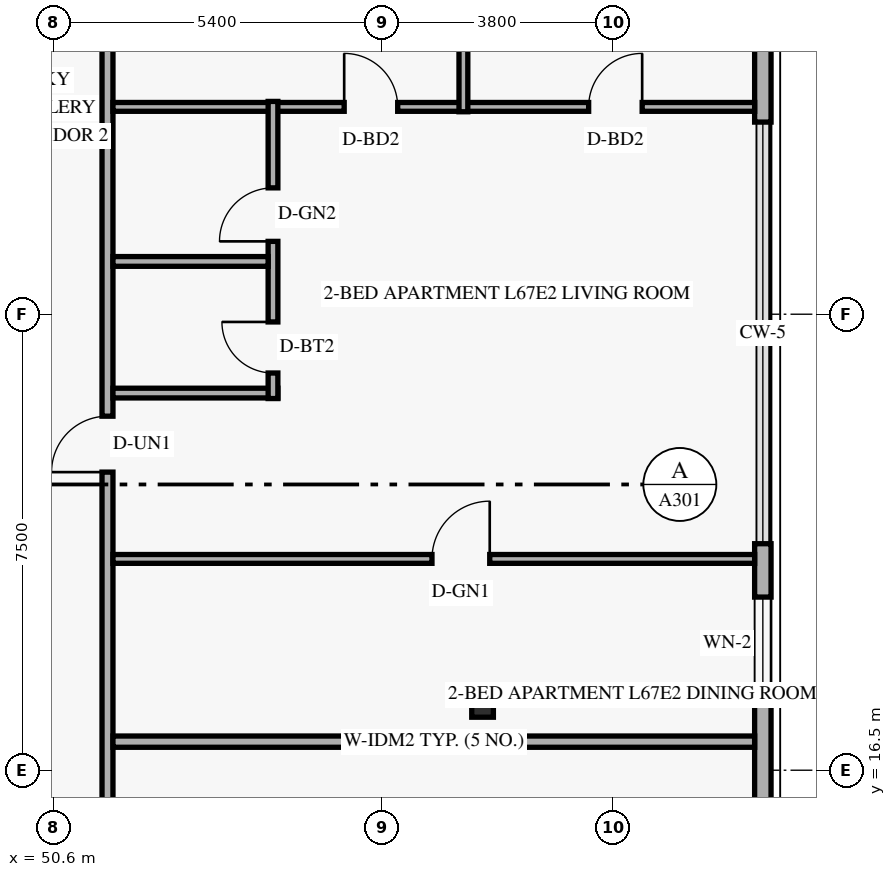
"""IFC4 building model, lengths in metres.
Left out: names, types, materials, properties, quantities, classifications, styles, units other than length and angle.
Written with IfcOpenShell. Run it as: python <this file> out.ifc"""

import sys

from ifc_helpers import new_model, si_unit, direction, frame, frame_2d, origin, origin_2d, place, context, subcontext, project, spatial, rectangle, hollow_rectangle, extrude, element, fill, save


model = new_model("IFC4")
c1 = context("Model", 3, precision=1e-05, world=origin(), true_north=direction((0.0, 1.0)))
c2 = subcontext(c1, "Body", "Model", "MODEL_VIEW")
j1 = project(units=[si_unit("LENGTHUNIT", "METRE"), si_unit("PLANEANGLEUNIT", "RADIAN")], contexts=[c1])
p1 = place(None, origin())
s1 = spatial("IfcSite", under=j1, at=p1, CompositionType="ELEMENT")
p2 = place(p1, origin())
s2 = spatial("IfcBuilding", under=s1, at=p2, CompositionType="ELEMENT")
p3 = place(p2, frame((0.0, 0.0, 256.8)))
s3 = spatial("IfcBuildingStorey", under=s2, at=p3, CompositionType="ELEMENT", Elevation=256.8)
p4 = place(p3, frame((57.551, 17.55, 0.0), z_axis=(0.057888518877, 0.0, 0.998323053617), x_axis=(0.0, 1.0, 0.0)))
e1 = element("IfcColumn", 1, at=p4, inside=s3, PredefinedType="COLUMN", context=c2, shape_type="SweptSolid", body=[
    extrude(hollow_rectangle(XDim=0.356, YDim=0.356, WallThickness=0.016, at=origin_2d()), origin(), (0.0, 0.0, 1.0), 3.606),
])
p5 = place(p3, frame((62.265, 9.12, 0.0), z_axis=(0.0, 0.0, 1.0), x_axis=(0.0, 1.0, 0.0)))
e2 = element("IfcWall", 2, at=p5, inside=s3, PredefinedType="SOLIDWALL", context=c2, shape_type="SweptSolid", body=[
    extrude(rectangle(XDim=11.105, YDim=0.27, at=frame_2d((5.553, 0.0))), origin(), (0.0, 0.0, 1.0), 3.36),
])
p6 = place(p5, frame((3.435, 0.0, 0.85)))
e3 = element("IfcOpeningElement", 3, at=p6, cuts=e2, PredefinedType="OPENING", context=c2, shape_type="SweptSolid", body=[
    extrude(rectangle(XDim=1.5, YDim=1.55, at=frame_2d((0.75, 0.775))), frame((0.0, 0.145, 0.0), z_axis=(0.0, -1.0, 0.0), x_axis=(1.0, 0.0, 0.0)), (0.0, 0.0, 1.0), 0.29),
])
p7 = place(p5, frame((8.728, 0.0, 0.85)))
e4 = element("IfcOpeningElement", 4, at=p7, cuts=e2, PredefinedType="OPENING", context=c2, shape_type="SweptSolid", body=[
    extrude(rectangle(XDim=1.5, YDim=1.55, at=frame_2d((0.75, 0.775))), frame((0.0, 0.145, 0.0), z_axis=(0.0, -1.0, 0.0), x_axis=(1.0, 0.0, 0.0)), (0.0, 0.0, 1.0), 0.29),
])
p8 = place(p3, frame((62.265, 27.16, 0.0), z_axis=(0.0, 0.0, 1.0), x_axis=(0.0, 1.0, 0.0)))
e5 = element("IfcWall", 5, at=p8, inside=s3, PredefinedType="SOLIDWALL", context=c2, shape_type="SweptSolid", body=[
    extrude(rectangle(XDim=11.72, YDim=0.27, at=frame_2d((5.86, 0.0))), origin(), (0.0, 0.0, 1.0), 3.36),
])
p9 = place(p8, frame((1.37, 0.0, 0.85)))
e6 = element("IfcOpeningElement", 6, at=p9, cuts=e5, PredefinedType="OPENING", context=c2, shape_type="SweptSolid", body=[
    extrude(rectangle(XDim=1.5, YDim=1.55, at=frame_2d((0.75, 0.775))), frame((0.0, 0.145, 0.0), z_axis=(0.0, -1.0, 0.0), x_axis=(1.0, 0.0, 0.0)), (0.0, 0.0, 1.0), 0.29),
])
p10 = place(p8, frame((7.035, 0.0, 0.85)))
e7 = element("IfcOpeningElement", 7, at=p10, cuts=e5, PredefinedType="OPENING", context=c2, shape_type="SweptSolid", body=[
    extrude(rectangle(XDim=1.5, YDim=1.55, at=frame_2d((0.75, 0.775))), frame((0.0, 0.145, 0.0), z_axis=(0.0, -1.0, 0.0), x_axis=(1.0, 0.0, 0.0)), (0.0, 0.0, 1.0), 0.29),
])
p11 = place(p3, frame((51.487, 5.77, 0.0), z_axis=(0.0, 0.0, 1.0), x_axis=(0.0, 1.0, 0.0)))
e8 = element("IfcWall", 8, at=p11, inside=s3, PredefinedType="STANDARD", context=c2, shape_type="SweptSolid", body=[
    extrude(rectangle(XDim=36.46, YDim=0.18, at=frame_2d((18.23, 0.0))), origin(), (0.0, 0.0, 1.0), 2.803),
])
p12 = place(p11, frame((8.907, 0.0, 0.0)))
e9 = element("IfcOpeningElement", 9, at=p12, cuts=e8, PredefinedType="OPENING", context=c2, shape_type="SweptSolid", body=[
    extrude(rectangle(XDim=0.92, YDim=2.15, at=frame_2d((0.46, 1.075))), frame((0.0, 0.1, 0.0), z_axis=(0.0, -1.0, 0.0), x_axis=(1.0, 0.0, 0.0)), (0.0, 0.0, 1.0), 0.2),
])
p13 = place(p11, frame((15.633, 0.0, 0.0)))
e10 = element("IfcOpeningElement", 10, at=p13, cuts=e8, PredefinedType="OPENING", context=c2, shape_type="SweptSolid", body=[
    extrude(rectangle(XDim=0.92, YDim=2.15, at=frame_2d((0.46, 1.075))), frame((0.0, 0.1, 0.0), z_axis=(0.0, -1.0, 0.0), x_axis=(1.0, 0.0, 0.0)), (0.0, 0.0, 1.0), 0.2),
])
p14 = place(p11, frame((26.685, 0.0, 0.0)))
e11 = element("IfcOpeningElement", 11, at=p14, cuts=e8, PredefinedType="OPENING", context=c2, shape_type="SweptSolid", body=[
    extrude(rectangle(XDim=0.92, YDim=2.15, at=frame_2d((0.46, 1.075))), frame((0.0, 0.1, 0.0), z_axis=(0.0, -1.0, 0.0), x_axis=(1.0, 0.0, 0.0)), (0.0, 0.0, 1.0), 0.2),
])
p15 = place(p3, frame((51.577, 16.97, 0.0), z_axis=(0.0, 0.0, 1.0), x_axis=(1.0, 0.0, 0.0)))
e12 = element("IfcWall", 12, at=p15, inside=s3, PredefinedType="PARTITIONING", context=c2, shape_type="SweptSolid", body=[
    extrude(rectangle(XDim=10.553, YDim=0.185, at=frame_2d((5.276, 0.0))), origin(), (0.0, 0.0, 1.0), 2.879),
])
p16 = place(p3, frame((51.577, 27.41, 0.0), z_axis=(0.0, 0.0, 1.0), x_axis=(1.0, 0.0, 0.0)))
e13 = element("IfcWall", 13, at=p16, inside=s3, PredefinedType="PARTITIONING", context=c2, shape_type="SweptSolid", body=[
    extrude(rectangle(XDim=10.553, YDim=0.145, at=frame_2d((5.276, 0.0))), origin(), (0.0, 0.0, 1.0), 2.879),
])
p17 = place(p16, frame((3.803, 0.0, 0.0)))
e14 = element("IfcOpeningElement", 14, at=p17, cuts=e13, PredefinedType="OPENING", context=c2, shape_type="SweptSolid", body=[
    extrude(rectangle(XDim=0.88, YDim=2.14, at=frame_2d((0.44, 1.07))), frame((0.0, 0.083, 0.0), z_axis=(0.0, -1.0, 0.0), x_axis=(1.0, 0.0, 0.0)), (0.0, 0.0, 1.0), 0.165),
])
p18 = place(p16, frame((7.823, 0.0, 0.0)))
e15 = element("IfcOpeningElement", 15, at=p18, cuts=e13, PredefinedType="OPENING", context=c2, shape_type="SweptSolid", body=[
    extrude(rectangle(XDim=0.88, YDim=2.14, at=frame_2d((0.44, 1.07))), frame((0.0, 0.083, 0.0), z_axis=(0.0, -1.0, 0.0), x_axis=(1.0, 0.0, 0.0)), (0.0, 0.0, 1.0), 0.165),
])
p19 = place(p3, frame((51.577, 22.703, 0.0), z_axis=(0.0, 0.0, 1.0), x_axis=(1.0, 0.0, 0.0)))
e16 = element("IfcWall", 16, at=p19, inside=s3, PredefinedType="PLUMBINGWALL", context=c2, shape_type="SweptSolid", body=[
    extrude(rectangle(XDim=2.712, YDim=0.16, at=frame_2d((1.356, 0.0))), origin(), (0.0, 0.0, 1.0), 3.36),
])
p20 = place(p3, frame((54.209, 22.613, 0.0), z_axis=(0.0, 0.0, 1.0), x_axis=(0.0, 1.0, 0.0)))
e17 = element("IfcWall", 17, at=p20, inside=s3, PredefinedType="PLUMBINGWALL", context=c2, shape_type="SweptSolid", body=[
    extrude(rectangle(XDim=4.887, YDim=0.16, at=frame_2d((2.443, 0.0))), origin(), (0.0, 0.0, 1.0), 3.36),
])
p21 = place(p20, frame((0.42, 0.0, 0.0)))
e18 = element("IfcOpeningElement", 18, at=p21, cuts=e17, PredefinedType="OPENING", context=c2, shape_type="SweptSolid", body=[
    extrude(rectangle(XDim=0.84, YDim=2.12, at=frame_2d((0.42, 1.06))), frame((0.0, 0.09, 0.0), z_axis=(0.0, -1.0, 0.0), x_axis=(1.0, 0.0, 0.0)), (0.0, 0.0, 1.0), 0.18),
])
p22 = place(p20, frame((2.585, 0.0, 0.0)))
e19 = element("IfcOpeningElement", 19, at=p22, cuts=e17, PredefinedType="OPENING", context=c2, shape_type="SweptSolid", body=[
    extrude(rectangle(XDim=0.88, YDim=2.12, at=frame_2d((0.44, 1.06))), frame((0.0, 0.09, 0.0), z_axis=(0.0, -1.0, 0.0), x_axis=(1.0, 0.0, 0.0)), (0.0, 0.0, 1.0), 0.18),
])
p23 = place(p3, frame((51.577, 24.868, 0.0), z_axis=(0.0, 0.0, 1.0), x_axis=(1.0, 0.0, 0.0)))
e20 = element("IfcWall", 20, at=p23, inside=s3, PredefinedType="PLUMBINGWALL", context=c2, shape_type="SweptSolid", body=[
    extrude(rectangle(XDim=2.552, YDim=0.16, at=frame_2d((1.276, 0.0))), origin(), (0.0, 0.0, 1.0), 3.36),
])
p24 = place(p3, frame((51.577, 19.975, 0.0), z_axis=(0.0, 0.0, 1.0), x_axis=(1.0, 0.0, 0.0)))
e21 = element("IfcWall", 21, at=p24, inside=s3, PredefinedType="PARTITIONING", context=c2, shape_type="SweptSolid", body=[
    extrude(rectangle(XDim=10.553, YDim=0.145, at=frame_2d((5.276, 0.0))), origin(), (0.0, 0.0, 1.0), 2.879),
])
p25 = place(p24, frame((5.247, 0.0, 0.0)))
e22 = element("IfcOpeningElement", 22, at=p25, cuts=e21, PredefinedType="OPENING", context=c2, shape_type="SweptSolid", body=[
    extrude(rectangle(XDim=0.95, YDim=2.15, at=frame_2d((0.475, 1.075))), frame((0.0, 0.083, 0.0), z_axis=(0.0, -1.0, 0.0), x_axis=(1.0, 0.0, 0.0)), (0.0, 0.0, 1.0), 0.165),
])
p26 = place(p3, frame((57.34, 27.33, 0.0), z_axis=(0.0, 0.0, 1.0), x_axis=(0.0, 1.0, 0.0)))
e23 = element("IfcWall", 23, at=p26, inside=s3, PredefinedType="PARTITIONING", context=c2, shape_type="SweptSolid", body=[
    extrude(rectangle(XDim=4.46, YDim=0.145, at=frame_2d((2.23, 0.0))), origin(), (0.0, 0.0, 1.0), 2.803),
])
p27 = place(p7, origin())
e24 = element("IfcWindow", 24, at=p27, inside=s3, PartitioningType="SINGLE_PANEL", PredefinedType="WINDOW", context=c2, shape_type="SweptSolid", body=[
    extrude(rectangle(XDim=1.5, YDim=1.55, at=frame_2d((0.75, 0.775))), frame((0.0, 0.03, 0.0), z_axis=(0.0, -1.0, 0.0), x_axis=(1.0, 0.0, 0.0)), (0.0, 0.0, 1.0), 0.06),
])
fill(e4, e24)
p28 = place(p25, origin())
e25 = element("IfcDoor", 25, at=p28, inside=s3, OperationType="SINGLE_SWING_RIGHT", PredefinedType="DOOR", context=c2, shape_type="SweptSolid", body=[
    extrude(rectangle(XDim=0.95, YDim=2.15, at=frame_2d((0.475, 1.075))), frame((0.0, 0.025, 0.0), z_axis=(0.0, -1.0, 0.0), x_axis=(1.0, 0.0, 0.0)), (0.0, 0.0, 1.0), 0.05),
])
fill(e22, e25)
p29 = place(p13, origin())
e26 = element("IfcDoor", 26, at=p29, inside=s3, OperationType="SINGLE_SWING_LEFT", PredefinedType="DOOR", context=c2, shape_type="SweptSolid", body=[
    extrude(rectangle(XDim=0.92, YDim=2.15, at=frame_2d((0.46, 1.075))), frame((0.0, 0.025, 0.0), z_axis=(0.0, -1.0, 0.0), x_axis=(1.0, 0.0, 0.0)), (0.0, 0.0, 1.0), 0.05),
])
fill(e10, e26)
p30 = place(p21, origin())
e27 = element("IfcDoor", 27, at=p30, inside=s3, OperationType="SINGLE_SWING_RIGHT", PredefinedType="DOOR", context=c2, shape_type="SweptSolid", body=[
    extrude(rectangle(XDim=0.84, YDim=2.12, at=frame_2d((0.42, 1.06))), frame((0.0, 0.025, 0.0), z_axis=(0.0, -1.0, 0.0), x_axis=(1.0, 0.0, 0.0)), (0.0, 0.0, 1.0), 0.05),
])
fill(e18, e27)
p31 = place(p22, origin())
e28 = element("IfcDoor", 28, at=p31, inside=s3, OperationType="SINGLE_SWING_LEFT", PredefinedType="DOOR", context=c2, shape_type="SweptSolid", body=[
    extrude(rectangle(XDim=0.88, YDim=2.12, at=frame_2d((0.44, 1.06))), frame((0.0, 0.025, 0.0), z_axis=(0.0, -1.0, 0.0), x_axis=(1.0, 0.0, 0.0)), (0.0, 0.0, 1.0), 0.05),
])
fill(e19, e28)
p32 = place(p17, origin())
e29 = element("IfcDoor", 29, at=p32, inside=s3, OperationType="SINGLE_SWING_LEFT", PredefinedType="DOOR", context=c2, shape_type="SweptSolid", body=[
    extrude(rectangle(XDim=0.88, YDim=2.14, at=frame_2d((0.44, 1.07))), frame((0.0, 0.025, 0.0), z_axis=(0.0, -1.0, 0.0), x_axis=(1.0, 0.0, 0.0)), (0.0, 0.0, 1.0), 0.05),
])
fill(e14, e29)
p33 = place(p18, origin())
e30 = element("IfcDoor", 30, at=p33, inside=s3, OperationType="SINGLE_SWING_RIGHT", PredefinedType="DOOR", context=c2, shape_type="SweptSolid", body=[
    extrude(rectangle(XDim=0.88, YDim=2.14, at=frame_2d((0.44, 1.07))), frame((0.0, 0.025, 0.0), z_axis=(0.0, -1.0, 0.0), x_axis=(1.0, 0.0, 0.0)), (0.0, 0.0, 1.0), 0.05),
])
fill(e15, e30)
save(model, sys.argv[1])
